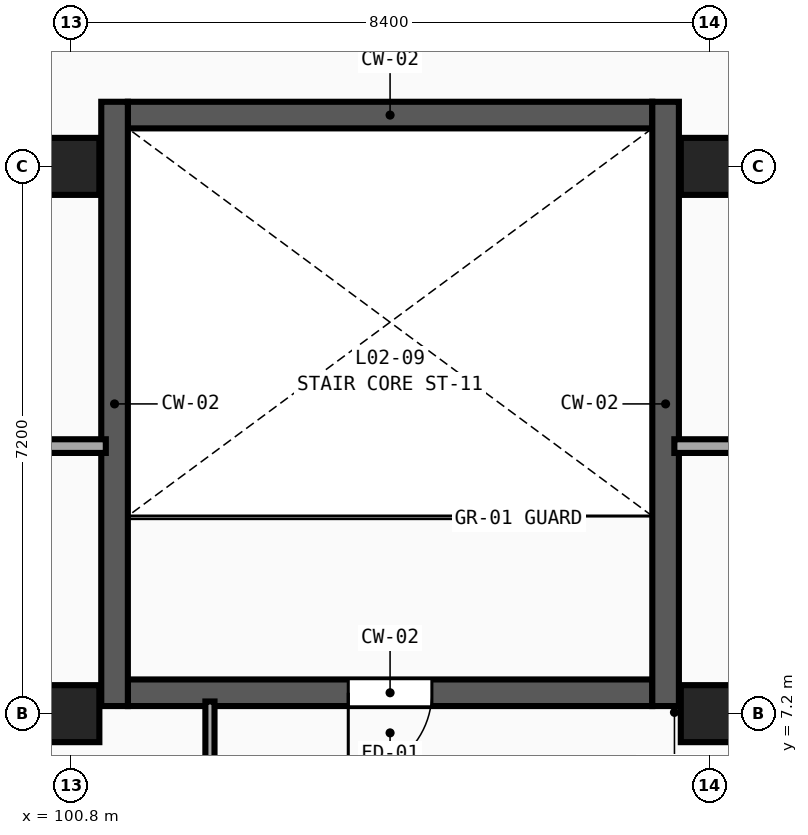
"""IFC4 building model, lengths in metres.
Left out: names, types, materials, properties, quantities, classifications, styles, units other than length and angle.
Written with IfcOpenShell. Run it as: python <this file> out.ifc"""

import sys

from ifc_helpers import new_model, si_unit, direction, frame, frame_2d, origin, origin_2d, place, context, subcontext, project, spatial, rectangle, extrude, element, fill, save


model = new_model("IFC4")
c1 = context("Model", 3, precision=1e-05, world=origin(), true_north=direction((0.0, 1.0)))
c2 = subcontext(c1, "Body", "Model", "MODEL_VIEW")
j1 = project(units=[si_unit("LENGTHUNIT", "METRE"), si_unit("PLANEANGLEUNIT", "RADIAN")], contexts=[c1])
p1 = place(None, origin())
s1 = spatial("IfcSite", under=j1, at=p1, CompositionType="ELEMENT")
p2 = place(p1, origin())
s2 = spatial("IfcBuilding", under=s1, at=p2, CompositionType="ELEMENT")
p3 = place(p2, frame((0.0, 0.0, 9.9)))
s3 = spatial("IfcBuildingStorey", under=s2, at=p3, CompositionType="ELEMENT", Elevation=9.9)
for number, where, z_axis, x_axis in (
    (1, (100.8, 7.2, 0.0), (0.0, 0.0, 1.0), (1.0, 0.0, 0.0)),
    (2, (100.8, 14.4, 0.0), (0.0, 0.0, 1.0), (1.0, 0.0, 0.0)),
    (3, (109.2, 7.2, 0.0), (0.0, 0.0, 1.0), (1.0, 0.0, 0.0)),
    (4, (109.2, 14.4, 0.0), (0.0, 0.0, 1.0), (1.0, 0.0, 0.0)),
):
    element("IfcColumn", number, at=place(p3, frame(where, z_axis=z_axis, x_axis=x_axis)), inside=s3, PredefinedType="COLUMN", context=c2, shape_type="SweptSolid", body=[
        extrude(rectangle(XDim=0.75, YDim=0.75, at=origin_2d()), origin(), (0.0, 0.0, 1.0), 4.5),
    ])
p4 = place(p3, frame((108.45, 7.475, 0.0), z_axis=(0.0, 0.0, 1.0), x_axis=(-1.0, 0.0, 0.0)))
e5 = element("IfcWall", 5, at=p4, inside=s3, PredefinedType="SHEAR", context=c2, shape_type="SweptSolid", body=[
    extrude(rectangle(XDim=6.9, YDim=0.35, at=frame_2d((3.45, 0.0))), origin(), (0.0, 0.0, 1.0), 4.5),
])
p5 = place(p4, frame((2.9, 0.0, 0.0)))
e6 = element("IfcOpeningElement", 6, at=p5, cuts=e5, PredefinedType="OPENING", context=c2, shape_type="SweptSolid", body=[
    extrude(rectangle(XDim=1.1, YDim=2.2, at=frame_2d((0.55, 1.1))), frame((0.0, 0.195, 0.0), z_axis=(0.0, -1.0, 0.0), x_axis=(1.0, 0.0, 0.0)), (0.0, 0.0, 1.0), 0.39),
])
p6 = place(p3, frame((101.55, 15.075, 0.0), z_axis=(0.0, 0.0, 1.0), x_axis=(1.0, 0.0, 0.0)))
e7 = element("IfcWall", 7, at=p6, inside=s3, PredefinedType="SHEAR", context=c2, shape_type="SweptSolid", body=[
    extrude(rectangle(XDim=6.9, YDim=0.35, at=frame_2d((3.45, 0.0))), origin(), (0.0, 0.0, 1.0), 4.5),
])
for number, where, z_axis, x_axis in (
    (8, (101.375, 15.25, 0.0), (0.0, 0.0, 1.0), (0.0, -1.0, 0.0)),
    (9, (108.625, 7.3, 0.0), (0.0, 0.0, 1.0), (0.0, 1.0, 0.0)),
):
    element("IfcWall", number, at=place(p3, frame(where, z_axis=z_axis, x_axis=x_axis)), inside=s3, PredefinedType="SHEAR", context=c2, shape_type="SweptSolid", body=[
        extrude(rectangle(XDim=7.95, YDim=0.35, at=frame_2d((3.975, 0.0))), origin(), (0.0, 0.0, 1.0), 4.5),
    ])
p7 = place(p3, frame((84.73, 10.72, 0.0), z_axis=(0.0, 0.0, 1.0), x_axis=(1.0, 0.0, 0.0)))
e10 = element("IfcWall", 10, at=p7, inside=s3, PredefinedType="PARTITIONING", context=c2, shape_type="SweptSolid", body=[
    extrude(rectangle(XDim=16.53, YDim=0.18, at=frame_2d((8.265, 0.0))), origin(), (0.0, 0.0, 1.0), 4.18),
])
p8 = place(p7, frame((7.745, 0.0, 0.0)))
e11 = element("IfcOpeningElement", 11, at=p8, cuts=e10, PredefinedType="OPENING", context=c2, shape_type="SweptSolid", body=[
    extrude(rectangle(XDim=1.04, YDim=2.45, at=frame_2d((0.52, 1.225))), frame((0.0, 0.11, 0.0), z_axis=(0.0, -1.0, 0.0), x_axis=(1.0, 0.0, 0.0)), (0.0, 0.0, 1.0), 0.22),
])
p9 = place(p3, frame((108.74, 10.72, 0.0), z_axis=(0.0, 0.0, 1.0), x_axis=(1.0, 0.0, 0.0)))
e12 = element("IfcWall", 12, at=p9, inside=s3, PredefinedType="PARTITIONING", context=c2, shape_type="SweptSolid", body=[
    extrude(rectangle(XDim=7.24, YDim=0.18, at=frame_2d((3.62, 0.0))), origin(), (0.0, 0.0, 1.0), 4.18),
])
p10 = place(p9, frame((2.86, 0.0, 0.0)))
e13 = element("IfcOpeningElement", 13, at=p10, cuts=e12, PredefinedType="OPENING", context=c2, shape_type="SweptSolid", body=[
    extrude(rectangle(XDim=1.52, YDim=2.37, at=frame_2d((0.76, 1.185))), frame((0.0, 0.11, 0.0), z_axis=(0.0, -1.0, 0.0), x_axis=(1.0, 0.0, 0.0)), (0.0, 0.0, 1.0), 0.22),
])
p11 = place(p3, frame((102.63, 0.37, 0.0), z_axis=(0.0, 0.0, 1.0), x_axis=(0.0, 1.0, 0.0)))
e14 = element("IfcWall", 14, at=p11, inside=s3, PredefinedType="PARTITIONING", context=c2, shape_type="SweptSolid", body=[
    extrude(rectangle(XDim=6.99, YDim=0.12, at=frame_2d((3.495, 0.0))), origin(), (0.0, 0.0, 1.0), 4.18),
])
p12 = place(p5, origin())
e15 = element("IfcDoor", 15, at=p12, inside=s3, OperationType="SINGLE_SWING_RIGHT", PredefinedType="DOOR", context=c2, shape_type="SweptSolid", body=[
    extrude(rectangle(XDim=1.1, YDim=2.2, at=frame_2d((0.55, 1.1))), frame((0.0, 0.025, 0.0), z_axis=(0.0, -1.0, 0.0), x_axis=(1.0, 0.0, 0.0)), (0.0, 0.0, 1.0), 0.05),
])
fill(e6, e15)
save(model, sys.argv[1])
